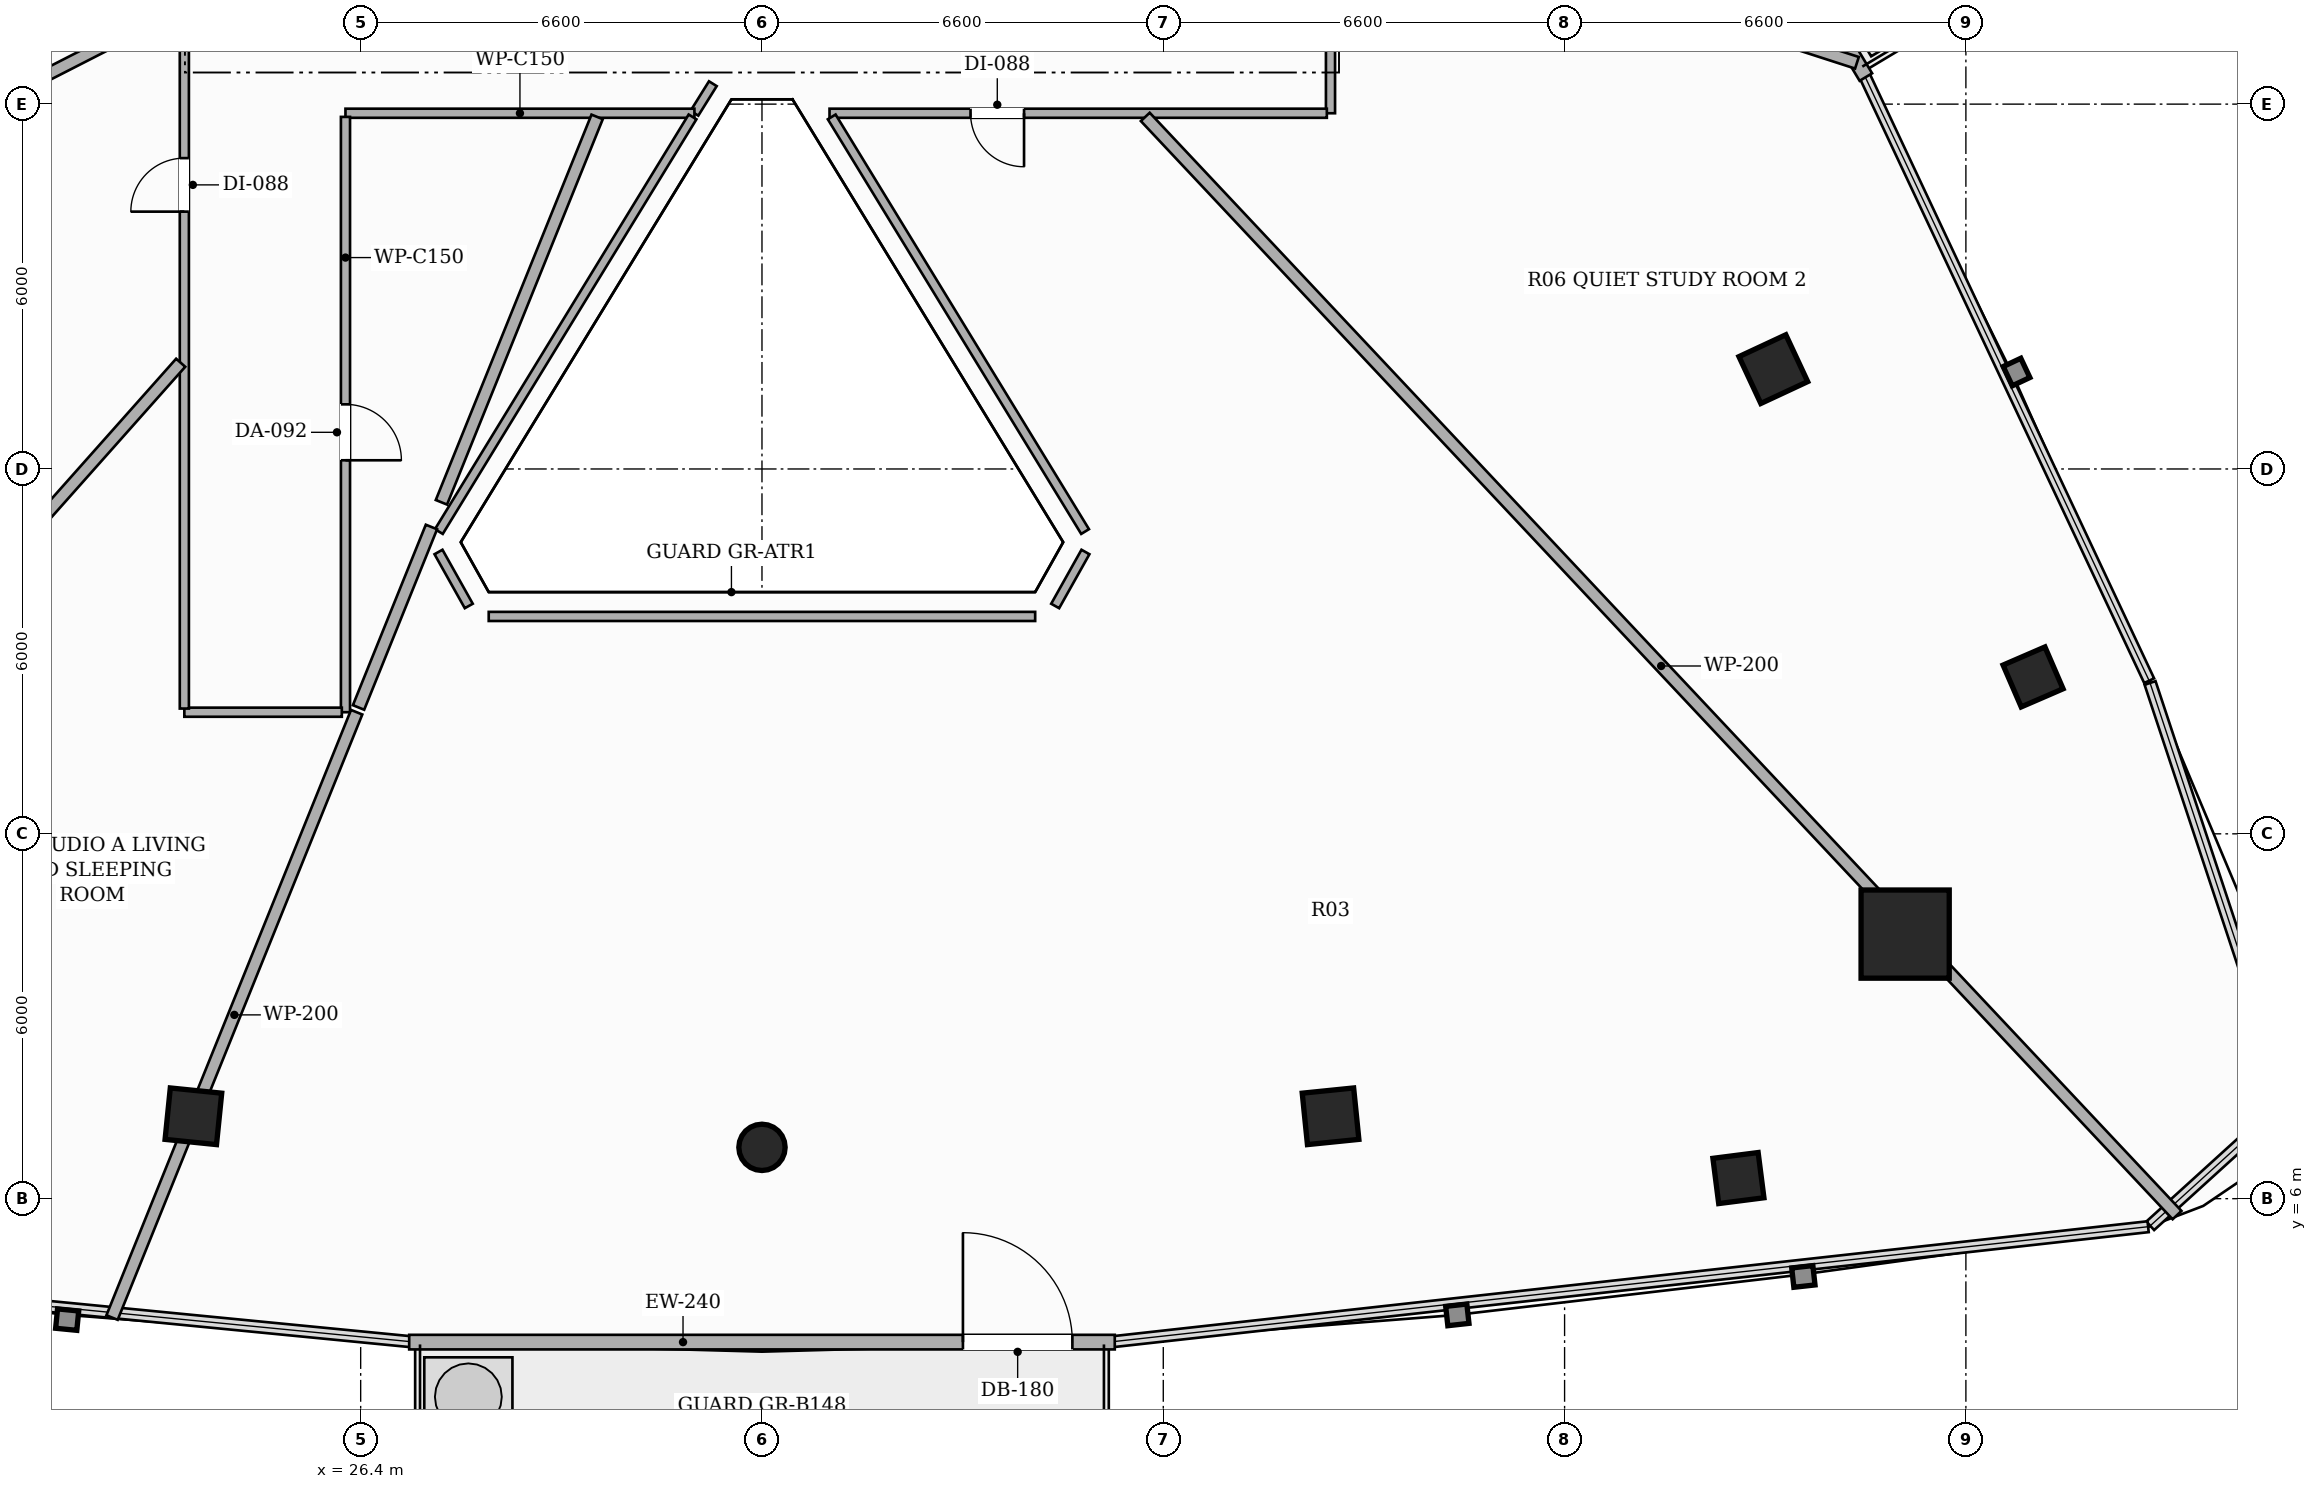
"""IFC4 building model, lengths in metres.
Left out: names, types, materials, properties, quantities, classifications, styles, units other than length and angle.
Written with IfcOpenShell. Run it as: python <this file> out.ifc"""

import sys

from ifc_helpers import new_model, si_unit, direction, frame, frame_2d, origin, origin_2d, place, context, subcontext, project, spatial, rectangle, hollow_rectangle, hollow_circle, extrude, element, fill, save


model = new_model("IFC4")
c1 = context("Model", 3, precision=1e-05, world=origin(), true_north=direction((0.0, 1.0)))
c2 = subcontext(c1, "Body", "Model", "MODEL_VIEW")
j1 = project(units=[si_unit("LENGTHUNIT", "METRE"), si_unit("PLANEANGLEUNIT", "RADIAN")], contexts=[c1])
p1 = place(None, origin())
s1 = spatial("IfcSite", under=j1, at=p1, CompositionType="ELEMENT")
p2 = place(p1, origin())
s2 = spatial("IfcBuilding", under=s1, at=p2, CompositionType="ELEMENT")
p3 = place(p2, frame((0.0, 0.0, 153.95)))
s3 = spatial("IfcBuildingStorey", under=s2, at=p3, CompositionType="ELEMENT", Elevation=153.95)
p4 = place(p3, frame((51.801, 10.351, 0.0), z_axis=(0.0, 0.0, 1.0), x_axis=(1.0, 0.0, 0.0)))
e1 = element("IfcColumn", 1, at=p4, inside=s3, PredefinedType="COLUMN", context=c2, shape_type="SweptSolid", body=[
    extrude(hollow_rectangle(XDim=1.45, YDim=1.45, WallThickness=0.045, at=origin_2d()), origin(), (0.0, 0.0, 1.0), 3.3),
])
p5 = place(p3, frame((23.649, 7.355, 0.0), z_axis=(0.0, 0.0, 1.0), x_axis=(-0.994880708829, 0.101056297183, 0.0)))
e2 = element("IfcColumn", 2, at=p5, inside=s3, PredefinedType="COLUMN", context=c2, shape_type="SweptSolid", body=[
    extrude(hollow_rectangle(XDim=0.85, YDim=0.85, WallThickness=0.028, at=origin_2d()), origin(), (0.0, 0.0, 1.0), 3.3),
])
p6 = place(p3, frame((33.0, 6.844, 0.0), z_axis=(0.0, 0.0, 1.0), x_axis=(1.0, 0.0, 0.0)))
e3 = element("IfcColumn", 3, at=p6, inside=s3, PredefinedType="COLUMN", context=c2, shape_type="SweptSolid", body=[
    extrude(hollow_circle(Radius=0.381, WallThickness=0.022, at=origin_2d()), origin(), (0.0, 0.0, 1.0), 3.3),
])
for number, where, z_axis, x_axis in (
    (4, (42.351, 7.355, 0.0), (0.0, 0.0, 1.0), (0.995, 0.101, 0.0)),
    (5, (49.633, 19.642, 0.0), (0.0, 0.0, 1.0), (-0.423, 0.906, 0.0)),
):
    element("IfcColumn", number, at=place(p3, frame(where, z_axis=z_axis, x_axis=x_axis)), inside=s3, PredefinedType="COLUMN", context=c2, shape_type="SweptSolid", body=[
        extrude(hollow_rectangle(XDim=0.85, YDim=0.85, WallThickness=0.028, at=origin_2d()), origin(), (0.0, 0.0, 1.0), 3.3),
    ])
for number, where, z_axis, x_axis in (
    (6, (49.059, 6.339, 0.0), (0.0, 0.0, 1.0), (0.992, 0.127, 0.0)),
    (7, (53.905, 14.58, 0.0), (0.0, 0.0, 1.0), (-0.397, 0.918, 0.0)),
):
    element("IfcColumn", number, at=place(p3, frame(where, z_axis=z_axis, x_axis=x_axis)), inside=s3, PredefinedType="COLUMN", context=c2, shape_type="SweptSolid", body=[
        extrude(hollow_rectangle(XDim=0.75, YDim=0.75, WallThickness=0.025, at=origin_2d()), origin(), (0.0, 0.0, 1.0), 3.3),
    ])
p7 = place(p3, frame((27.198, 3.641, 0.0), z_axis=(0.0, 0.0, 1.0), x_axis=(1.0, 0.0, 0.0)))
e8 = element("IfcWall", 8, at=p7, inside=s3, PredefinedType="SOLIDWALL", context=c2, shape_type="SweptSolid", body=[
    extrude(rectangle(XDim=11.604, YDim=0.24, at=frame_2d((5.802, 0.0))), origin(), (0.0, 0.0, 1.0), 2.624),
])
p8 = place(p7, frame((9.107, 0.0, 0.0)))
e9 = element("IfcOpeningElement", 9, at=p8, cuts=e8, PredefinedType="OPENING", context=c2, shape_type="SweptSolid", body=[
    extrude(rectangle(XDim=1.8, YDim=2.2, at=frame_2d((0.9, 1.1))), frame((0.0, 0.13, 0.0), z_axis=(0.0, -1.0, 0.0), x_axis=(1.0, 0.0, 0.0)), (0.0, 0.0, 1.0), 0.26),
])
p9 = place(p3, frame((51.155, 24.445, 0.0), z_axis=(0.0, 0.0, 1.0), x_axis=(-0.514335781973, 0.857588889493, 0.0)))
e10 = element("IfcWall", 10, at=p9, inside=s3, PredefinedType="SOLIDWALL", context=c2, shape_type="SweptSolid", body=[
    extrude(rectangle(XDim=11.222, YDim=0.24, at=frame_2d((5.611, 0.0))), origin(), (0.0, 0.0, 1.0), 2.624),
])
p10 = place(p9, frame((8.725, 0.0, 0.0)))
e11 = element("IfcOpeningElement", 11, at=p10, cuts=e10, PredefinedType="OPENING", context=c2, shape_type="SweptSolid", body=[
    extrude(rectangle(XDim=1.8, YDim=2.2, at=frame_2d((0.9, 1.1))), frame((0.0, 0.13, 0.0), z_axis=(0.0, -1.0, 0.0), x_axis=(1.0, 0.0, 0.0)), (0.0, 0.0, 1.0), 0.26),
])
p11 = place(p3, frame((32.192, 24.336, 0.0), z_axis=(0.0, 0.0, 1.0), x_axis=(-0.529155471054, -0.848524889119, 0.0)))
e12 = element("IfcWall", 12, at=p11, inside=s3, PredefinedType="PARTITIONING", context=c2, shape_type="SweptSolid", body=[
    extrude(rectangle(XDim=0.573, YDim=0.15, at=frame_2d((0.286, 0.0))), origin(), (0.0, 0.0, 1.0), 3.06),
])
p12 = place(p3, frame((31.889, 23.85, 0.0), z_axis=(0.0, 0.0, 1.0), x_axis=(-1.0, 0.0, 0.0)))
e13 = element("IfcWall", 13, at=p12, inside=s3, PredefinedType="PARTITIONING", context=c2, shape_type="SweptSolid", body=[
    extrude(rectangle(XDim=5.739, YDim=0.15, at=frame_2d((2.87, 0.0))), origin(), (0.0, 0.0, 1.0), 2.721),
])
p13 = place(p3, frame((26.15, 23.79, 0.0), z_axis=(0.0, 0.0, 1.0), x_axis=(0.0, -1.0, 0.0)))
e14 = element("IfcWall", 14, at=p13, inside=s3, PredefinedType="PARTITIONING", context=c2, shape_type="SweptSolid", body=[
    extrude(rectangle(XDim=9.79, YDim=0.15, at=frame_2d((4.895, 0.0))), origin(), (0.0, 0.0, 1.0), 2.721),
])
p14 = place(p13, frame((4.727, 0.0, 0.0)))
e15 = element("IfcOpeningElement", 15, at=p14, cuts=e14, PredefinedType="OPENING", context=c2, shape_type="SweptSolid", body=[
    extrude(rectangle(XDim=0.92, YDim=2.15, at=frame_2d((0.46, 1.075))), frame((0.0, 0.085, 0.0), z_axis=(0.0, -1.0, 0.0), x_axis=(1.0, 0.0, 0.0)), (0.0, 0.0, 1.0), 0.17),
])
p15 = place(p3, frame((26.09, 14.0, 0.0), z_axis=(0.0, 0.0, 1.0), x_axis=(-1.0, 0.0, 0.0)))
e16 = element("IfcWall", 16, at=p15, inside=s3, PredefinedType="PARTITIONING", context=c2, shape_type="SweptSolid", body=[
    extrude(rectangle(XDim=2.59, YDim=0.15, at=frame_2d((1.295, 0.0))), origin(), (0.0, 0.0, 1.0), 2.721),
])
p16 = place(p3, frame((23.5, 14.06, 0.0), z_axis=(0.0, 0.0, 1.0), x_axis=(0.0, 1.0, 0.0)))
e17 = element("IfcWall", 17, at=p16, inside=s3, PredefinedType="PARTITIONING", context=c2, shape_type="SweptSolid", body=[
    extrude(rectangle(XDim=22.84, YDim=0.15, at=frame_2d((11.42, 0.0))), origin(), (0.0, 0.0, 1.0), 2.413),
])
p17 = place(p16, frame((8.172, 0.0, 0.0)))
e18 = element("IfcOpeningElement", 18, at=p17, cuts=e17, PredefinedType="OPENING", context=c2, shape_type="SweptSolid", body=[
    extrude(rectangle(XDim=0.88, YDim=2.1, at=frame_2d((0.44, 1.05))), frame((0.0, 0.085, 0.0), z_axis=(0.0, -1.0, 0.0), x_axis=(1.0, 0.0, 0.0)), (0.0, 0.0, 1.0), 0.17),
])
p18 = place(p16, frame((20.969, 0.0, 0.0)))
e19 = element("IfcOpeningElement", 19, at=p18, cuts=e17, PredefinedType="OPENING", context=c2, shape_type="SweptSolid", body=[
    extrude(rectangle(XDim=0.88, YDim=2.1, at=frame_2d((0.44, 1.05))), frame((0.0, 0.085, 0.0), z_axis=(0.0, -1.0, 0.0), x_axis=(1.0, 0.0, 0.0)), (0.0, 0.0, 1.0), 0.17),
])
p19 = place(p16, frame((15.484, 0.0, 0.0)))
e20 = element("IfcOpeningElement", 20, at=p19, cuts=e17, PredefinedType="OPENING", context=c2, shape_type="SweptSolid", body=[
    extrude(rectangle(XDim=0.88, YDim=2.1, at=frame_2d((0.44, 1.05))), frame((0.0, 0.085, 0.0), z_axis=(0.0, -1.0, 0.0), x_axis=(1.0, 0.0, 0.0)), (0.0, 0.0, 1.0), 0.17),
])
p20 = place(p3, frame((42.35, 28.34, 0.0), z_axis=(0.0, 0.0, 1.0), x_axis=(0.0, -1.0, 0.0)))
e21 = element("IfcWall", 21, at=p20, inside=s3, PredefinedType="PARTITIONING", context=c2, shape_type="SweptSolid", body=[
    extrude(rectangle(XDim=4.49, YDim=0.15, at=frame_2d((2.245, 0.0))), origin(), (0.0, 0.0, 1.0), 2.721),
])
p21 = place(p20, frame((2.086, 0.0, 0.0)))
e22 = element("IfcOpeningElement", 22, at=p21, cuts=e21, PredefinedType="OPENING", context=c2, shape_type="SweptSolid", body=[
    extrude(rectangle(XDim=0.88, YDim=2.1, at=frame_2d((0.44, 1.05))), frame((0.0, 0.085, 0.0), z_axis=(0.0, -1.0, 0.0), x_axis=(1.0, 0.0, 0.0)), (0.0, 0.0, 1.0), 0.17),
])
p22 = place(p3, frame((42.29, 23.85, 0.0), z_axis=(0.0, 0.0, 1.0), x_axis=(-1.0, 0.0, 0.0)))
e23 = element("IfcWall", 23, at=p22, inside=s3, PredefinedType="PARTITIONING", context=c2, shape_type="SweptSolid", body=[
    extrude(rectangle(XDim=8.179, YDim=0.15, at=frame_2d((4.089, 0.0))), origin(), (0.0, 0.0, 1.0), 2.492),
])
p23 = place(p22, frame((4.98, 0.0, 0.0)))
e24 = element("IfcOpeningElement", 24, at=p23, cuts=e23, PredefinedType="OPENING", context=c2, shape_type="SweptSolid", body=[
    extrude(rectangle(XDim=0.88, YDim=2.1, at=frame_2d((0.44, 1.05))), frame((0.0, 0.085, 0.0), z_axis=(0.0, -1.0, 0.0), x_axis=(1.0, 0.0, 0.0)), (0.0, 0.0, 1.0), 0.17),
])
p24 = place(p3, frame((34.147, 23.79, 0.0), z_axis=(0.0, 0.0, 1.0), x_axis=(0.521429001816, -0.853294671298, 0.0)))
e25 = element("IfcWall", 25, at=p24, inside=s3, PredefinedType="PARTITIONING", context=c2, shape_type="SweptSolid", body=[
    extrude(rectangle(XDim=7.991, YDim=0.15, at=frame_2d((3.996, 0.0))), origin(), (0.0, 0.0, 1.0), 2.721),
])
p25 = place(p3, frame((38.32, 16.635, 0.0), z_axis=(0.0, 0.0, 1.0), x_axis=(-0.489202035948, -0.872170492521, 0.0)))
e26 = element("IfcWall", 26, at=p25, inside=s3, PredefinedType="PARTITIONING", context=c2, shape_type="SweptSolid", body=[
    extrude(rectangle(XDim=1.018, YDim=0.15, at=frame_2d((0.509, 0.0))), origin(), (0.0, 0.0, 1.0), 3.06),
])
p26 = place(p3, frame((37.493, 15.575, 0.0), z_axis=(0.0, 0.0, 1.0), x_axis=(-1.0, 0.0, 0.0)))
e27 = element("IfcWall", 27, at=p26, inside=s3, PredefinedType="PARTITIONING", context=c2, shape_type="SweptSolid", body=[
    extrude(rectangle(XDim=8.987, YDim=0.15, at=frame_2d((4.493, 0.0))), origin(), (0.0, 0.0, 1.0), 2.721),
])
p27 = place(p3, frame((28.178, 15.747, 0.0), z_axis=(0.0, 0.0, 1.0), x_axis=(-0.489202035948, 0.872170492521, 0.0)))
e28 = element("IfcWall", 28, at=p27, inside=s3, PredefinedType="PARTITIONING", context=c2, shape_type="SweptSolid", body=[
    extrude(rectangle(XDim=1.018, YDim=0.15, at=frame_2d((0.509, 0.0))), origin(), (0.0, 0.0, 1.0), 3.06),
])
p28 = place(p3, frame((27.686, 16.971, 0.0), z_axis=(0.0, 0.0, 1.0), x_axis=(0.521873666917, 0.853022787374, 0.0)))
e29 = element("IfcWall", 29, at=p28, inside=s3, PredefinedType="PARTITIONING", context=c2, shape_type="SweptSolid", body=[
    extrude(rectangle(XDim=7.994, YDim=0.15, at=frame_2d((3.997, 0.0))), origin(), (0.0, 0.0, 1.0), 2.721),
])
p29 = place(p3, frame((39.304, 23.79, 0.0), z_axis=(0.0, 0.0, 1.0), x_axis=(0.684750154022, -0.72877789934, 0.0)))
e30 = element("IfcWall", 30, at=p29, inside=s3, PredefinedType="PARTITIONING", context=c2, shape_type="SweptSolid", body=[
    extrude(rectangle(XDim=24.781, YDim=0.2, at=frame_2d((12.391, 0.0))), origin(), (0.0, 0.0, 1.0), 2.413),
])
p30 = place(p3, frame((22.311, 4.045, 0.0), z_axis=(0.0, 0.0, 1.0), x_axis=(0.374673572515, 0.92715679044, 0.0)))
e31 = element("IfcWall", 31, at=p30, inside=s3, PredefinedType="PARTITIONING", context=c2, shape_type="SweptSolid", body=[
    extrude(rectangle(XDim=10.737, YDim=0.2, at=frame_2d((5.369, 0.0))), origin(), (0.0, 0.0, 1.0), 2.413),
])
p31 = place(p3, frame((26.365, 14.078, 0.0), z_axis=(0.0, 0.0, 1.0), x_axis=(0.374557626207, 0.927203637099, 0.0)))
e32 = element("IfcWall", 32, at=p31, inside=s3, PredefinedType="PARTITIONING", context=c2, shape_type="SweptSolid", body=[
    extrude(rectangle(XDim=3.201, YDim=0.2, at=frame_2d((1.601, 0.0))), origin(), (0.0, 0.0, 1.0), 3.06),
])
p32 = place(p3, frame((27.728, 17.452, 0.0), z_axis=(0.0, 0.0, 1.0), x_axis=(0.374639602714, 0.927170517261, 0.0)))
e33 = element("IfcWall", 33, at=p32, inside=s3, PredefinedType="PARTITIONING", context=c2, shape_type="SweptSolid", body=[
    extrude(rectangle(XDim=6.836, YDim=0.2, at=frame_2d((3.418, 0.0))), origin(), (0.0, 0.0, 1.0), 2.721),
])
p33 = place(p3, frame((42.41, 27.459, 0.0), z_axis=(0.0, 0.0, 1.0), x_axis=(0.951531988225, -0.307549793343, 0.0)))
e34 = element("IfcWall", 34, at=p33, inside=s3, PredefinedType="PARTITIONING", context=c2, shape_type="SweptSolid", body=[
    extrude(rectangle(XDim=9.036, YDim=0.2, at=frame_2d((4.518, 0.0))), origin(), (0.0, 0.0, 1.0), 2.413),
])
p34 = place(p3, frame((23.44, 19.747, 0.0), z_axis=(0.0, 0.0, 1.0), x_axis=(-0.664444771995, -0.747337370248, 0.0)))
e35 = element("IfcWall", 35, at=p34, inside=s3, PredefinedType="PARTITIONING", context=c2, shape_type="SweptSolid", body=[
    extrude(rectangle(XDim=19.097, YDim=0.2, at=frame_2d((9.549, 0.0))), origin(), (0.0, 0.0, 1.0), 2.413),
])
p35 = place(p3, frame((12.728, 20.13, 0.0), z_axis=(0.0, 0.0, 1.0), x_axis=(0.890257920911, 0.455456731486, 0.0)))
e36 = element("IfcWall", 36, at=p35, inside=s3, PredefinedType="PARTITIONING", context=c2, shape_type="SweptSolid", body=[
    extrude(rectangle(XDim=12.032, YDim=0.2, at=frame_2d((6.016, 0.0))), origin(), (0.0, 0.0, 1.0), 2.413),
])
p36 = place(p8, origin())
e37 = element("IfcDoor", 37, at=p36, inside=s3, OperationType="SINGLE_SWING_LEFT", PredefinedType="DOOR", context=c2, shape_type="SweptSolid", body=[
    extrude(rectangle(XDim=1.8, YDim=2.2, at=frame_2d((0.9, 1.1))), frame((0.0, 0.025, 0.0), z_axis=(0.0, -1.0, 0.0), x_axis=(1.0, 0.0, 0.0)), (0.0, 0.0, 1.0), 0.05),
])
fill(e9, e37)
p37 = place(p23, origin())
e38 = element("IfcDoor", 38, at=p37, inside=s3, OperationType="SINGLE_SWING_LEFT", PredefinedType="DOOR", context=c2, shape_type="SweptSolid", body=[
    extrude(rectangle(XDim=0.88, YDim=2.1, at=frame_2d((0.44, 1.05))), frame((0.0, 0.025, 0.0), z_axis=(0.0, -1.0, 0.0), x_axis=(1.0, 0.0, 0.0)), (0.0, 0.0, 1.0), 0.05),
])
fill(e24, e38)
p38 = place(p17, origin())
e39 = element("IfcDoor", 39, at=p38, inside=s3, OperationType="SINGLE_SWING_LEFT", PredefinedType="DOOR", context=c2, shape_type="SweptSolid", body=[
    extrude(rectangle(XDim=0.88, YDim=2.1, at=frame_2d((0.44, 1.05))), frame((0.0, 0.025, 0.0), z_axis=(0.0, -1.0, 0.0), x_axis=(1.0, 0.0, 0.0)), (0.0, 0.0, 1.0), 0.05),
])
fill(e18, e39)
p39 = place(p14, origin())
e40 = element("IfcDoor", 40, at=p39, inside=s3, OperationType="SINGLE_SWING_RIGHT", PredefinedType="DOOR", context=c2, shape_type="SweptSolid", body=[
    extrude(rectangle(XDim=0.92, YDim=2.15, at=frame_2d((0.46, 1.075))), frame((0.0, 0.025, 0.0), z_axis=(0.0, -1.0, 0.0), x_axis=(1.0, 0.0, 0.0)), (0.0, 0.0, 1.0), 0.05),
])
fill(e15, e40)
save(model, sys.argv[1])
